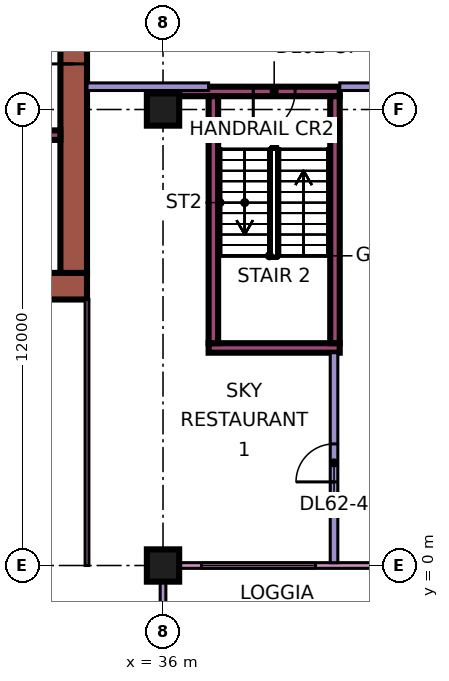
"""IFC4 building model, lengths in metres.
Left out: names, types, materials, properties, quantities, classifications, styles, units other than length and angle.
Written with IfcOpenShell. Run it as: python <this file> out.ifc"""

import sys

from ifc_helpers import new_model, si_unit, direction, frame, frame_2d, origin, origin_2d, place, context, subcontext, project, spatial, rectangle, extrude, element, fill, save


model = new_model("IFC4")
c1 = context("Model", 3, precision=1e-05, world=origin(), true_north=direction((0.0, 1.0)))
c2 = subcontext(c1, "Body", "Model", "MODEL_VIEW")
j1 = project(units=[si_unit("LENGTHUNIT", "METRE"), si_unit("PLANEANGLEUNIT", "RADIAN")], contexts=[c1])
p1 = place(None, origin())
s1 = spatial("IfcSite", under=j1, at=p1, CompositionType="ELEMENT")
p2 = place(p1, origin())
s2 = spatial("IfcBuilding", under=s1, at=p2, CompositionType="ELEMENT")
p3 = place(p2, frame((0.0, 0.0, 262.15)))
s3 = spatial("IfcBuildingStorey", under=s2, at=p3, CompositionType="ELEMENT", Elevation=262.15)
for number, where, z_axis, x_axis in (
    (1, (36.0, 0.0, 0.0), (0.0, 0.0, 1.0), (1.0, 0.0, 0.0)),
    (2, (36.0, 12.0, 0.0), (0.0, 0.0, 1.0), (1.0, 0.0, 0.0)),
):
    element("IfcColumn", number, at=place(p3, frame(where, z_axis=z_axis, x_axis=x_axis)), inside=s3, PredefinedType="COLUMN", context=c2, shape_type="SweptSolid", body=[
        extrude(rectangle(XDim=0.85, YDim=0.85, at=origin_2d()), origin(), (0.0, 0.0, 1.0), 11.25),
    ])
p4 = place(p3, frame((9.0, 7.35, 0.0), z_axis=(0.0, 0.0, 1.0), x_axis=(1.0, 0.0, 0.0)))
e3 = element("IfcWall", 3, at=p4, inside=s3, PredefinedType="SHEAR", context=c2, shape_type="SweptSolid", body=[
    extrude(rectangle(XDim=25.0, YDim=0.7, at=frame_2d((12.5, 0.0))), origin(), (0.0, 0.0, 1.0), 11.25),
])
p5 = place(p3, frame((33.65, 7.7, 0.0), z_axis=(0.0, 0.0, 1.0), x_axis=(0.0, 1.0, 0.0)))
e4 = element("IfcWall", 4, at=p5, inside=s3, PredefinedType="SHEAR", context=c2, shape_type="SweptSolid", body=[
    extrude(rectangle(XDim=11.6, YDim=0.7, at=frame_2d((5.8, 0.0))), origin(), (0.0, 0.0, 1.0), 11.25),
])
p6 = place(p5, frame((5.5, 0.0, 0.0)))
e5 = element("IfcOpeningElement", 5, at=p6, cuts=e4, PredefinedType="OPENING", context=c2, shape_type="SweptSolid", body=[
    extrude(rectangle(XDim=1.8, YDim=2.4, at=frame_2d((0.9, 1.2))), frame((0.0, 0.36, 0.0), z_axis=(0.0, -1.0, 0.0), x_axis=(1.0, 0.0, 0.0)), (0.0, 0.0, 1.0), 0.72),
])
p7 = place(p3, frame((13.45, 11.325, 0.0), z_axis=(0.0, 0.0, 1.0), x_axis=(1.0, 0.0, 0.0)))
e6 = element("IfcWall", 6, at=p7, inside=s3, PredefinedType="SHEAR", context=c2, shape_type="SweptSolid", body=[
    extrude(rectangle(XDim=19.85, YDim=0.25, at=frame_2d((9.925, 0.0))), origin(), (0.0, 0.0, 1.0), 11.25),
])
p8 = place(p7, frame((11.65, 0.0, 0.0)))
e7 = element("IfcOpeningElement", 7, at=p8, cuts=e6, PredefinedType="OPENING", context=c2, shape_type="SweptSolid", body=[
    extrude(rectangle(XDim=1.2, YDim=2.2, at=frame_2d((0.6, 1.1))), frame((0.0, 0.135, 0.0), z_axis=(0.0, -1.0, 0.0), x_axis=(1.0, 0.0, 0.0)), (0.0, 0.0, 1.0), 0.27),
])
p9 = place(p7, frame((14.4, 0.0, 0.0)))
e8 = element("IfcOpeningElement", 8, at=p9, cuts=e6, PredefinedType="OPENING", context=c2, shape_type="SweptSolid", body=[
    extrude(rectangle(XDim=1.2, YDim=2.2, at=frame_2d((0.6, 1.1))), frame((0.0, 0.135, 0.0), z_axis=(0.0, -1.0, 0.0), x_axis=(1.0, 0.0, 0.0)), (0.0, 0.0, 1.0), 0.27),
])
p10 = place(p7, frame((17.15, 0.0, 0.0)))
e9 = element("IfcOpeningElement", 9, at=p10, cuts=e6, PredefinedType="OPENING", context=c2, shape_type="SweptSolid", body=[
    extrude(rectangle(XDim=1.2, YDim=2.2, at=frame_2d((0.6, 1.1))), frame((0.0, 0.135, 0.0), z_axis=(0.0, -1.0, 0.0), x_axis=(1.0, 0.0, 0.0)), (0.0, 0.0, 1.0), 0.27),
])
p11 = place(p7, frame((1.55, 0.0, 0.0)))
e10 = element("IfcOpeningElement", 10, at=p11, cuts=e6, PredefinedType="OPENING", context=c2, shape_type="SweptSolid", body=[
    extrude(rectangle(XDim=0.9, YDim=2.1, at=frame_2d((0.45, 1.05))), frame((0.0, 0.135, 0.0), z_axis=(0.0, -1.0, 0.0), x_axis=(1.0, 0.0, 0.0)), (0.0, 0.0, 1.0), 0.27),
])
p12 = place(p7, frame((6.925, 0.0, 0.0)))
e11 = element("IfcOpeningElement", 11, at=p12, cuts=e6, PredefinedType="OPENING", context=c2, shape_type="SweptSolid", body=[
    extrude(rectangle(XDim=0.9, YDim=2.1, at=frame_2d((0.45, 1.05))), frame((0.0, 0.135, 0.0), z_axis=(0.0, -1.0, 0.0), x_axis=(1.0, 0.0, 0.0)), (0.0, 0.0, 1.0), 0.27),
])
p13 = place(p3, frame((37.2, 5.725, 0.0), z_axis=(0.0, 0.0, 1.0), x_axis=(1.0, 0.0, 0.0)))
e12 = element("IfcWall", 12, at=p13, inside=s3, PredefinedType="SHEAR", context=c2, shape_type="SweptSolid", body=[
    extrude(rectangle(XDim=3.45, YDim=0.25, at=frame_2d((1.725, 0.0))), origin(), (0.0, 0.0, 1.0), 11.25),
])
p14 = place(p3, frame((36.425, 12.475, 0.0), z_axis=(0.0, 0.0, 1.0), x_axis=(1.0, 0.0, 0.0)))
e13 = element("IfcWall", 13, at=p14, inside=s3, PredefinedType="SHEAR", context=c2, shape_type="SweptSolid", body=[
    extrude(rectangle(XDim=4.225, YDim=0.25, at=frame_2d((2.112, 0.0))), origin(), (0.0, 0.0, 1.0), 11.25),
])
p15 = place(p14, frame((1.95, 0.0, 0.0)))
e14 = element("IfcOpeningElement", 14, at=p15, cuts=e13, PredefinedType="OPENING", context=c2, shape_type="SweptSolid", body=[
    extrude(rectangle(XDim=1.1, YDim=2.2, at=frame_2d((0.55, 1.1))), frame((0.0, 0.135, 0.0), z_axis=(0.0, -1.0, 0.0), x_axis=(1.0, 0.0, 0.0)), (0.0, 0.0, 1.0), 0.27),
])
for number, where, z_axis, x_axis in (
    (15, (37.325, 5.85, 0.0), (0.0, 0.0, 1.0), (0.0, 1.0, 0.0)),
    (16, (40.525, 5.85, 0.0), (0.0, 0.0, 1.0), (0.0, 1.0, 0.0)),
):
    element("IfcWall", number, at=place(p3, frame(where, z_axis=z_axis, x_axis=x_axis)), inside=s3, PredefinedType="SHEAR", context=c2, shape_type="SweptSolid", body=[
        extrude(rectangle(XDim=6.5, YDim=0.25, at=frame_2d((3.25, 0.0))), origin(), (0.0, 0.0, 1.0), 11.25),
    ])
p16 = place(p3, frame((36.075, 0.0, 0.0), z_axis=(0.0, 0.0, 1.0), x_axis=(1.0, 0.0, 0.0)))
e17 = element("IfcWall", 17, at=p16, inside=s3, PredefinedType="SOLIDWALL", context=c2, shape_type="SweptSolid", body=[
    extrude(rectangle(XDim=11.85, YDim=0.15, at=frame_2d((5.925, 0.0))), origin(), (0.0, 0.0, 1.0), 10.85),
])
p17 = place(p16, frame((0.938, 0.0, 0.45)))
e18 = element("IfcOpeningElement", 18, at=p17, cuts=e17, PredefinedType="OPENING", context=c2, shape_type="SweptSolid", body=[
    extrude(rectangle(XDim=3.0, YDim=9.8, at=frame_2d((1.5, 4.9))), frame((0.0, 0.085, 0.0), z_axis=(0.0, -1.0, 0.0), x_axis=(1.0, 0.0, 0.0)), (0.0, 0.0, 1.0), 0.17),
])
p18 = place(p3, frame((36.0, -1.5, 0.0), z_axis=(0.0, 0.0, 1.0), x_axis=(0.0, 1.0, 0.0)))
e19 = element("IfcWall", 19, at=p18, inside=s3, PredefinedType="SOLIDWALL", context=c2, shape_type="SweptSolid", body=[
    extrude(rectangle(XDim=1.5, YDim=0.15, at=frame_2d((0.75, 0.0))), origin(), (0.0, 0.0, 1.0), 10.85),
])
p19 = place(p3, frame((34.0, 0.0, 0.0), z_axis=(0.0, 0.0, 1.0), x_axis=(0.0, 1.0, 0.0)))
e20 = element("IfcWall", 20, at=p19, inside=s3, PredefinedType="PARTITIONING", context=c2, shape_type="SweptSolid", body=[
    extrude(rectangle(XDim=7.0, YDim=0.1, at=frame_2d((3.5, 0.0))), origin(), (0.0, 0.0, 1.0), 10.85),
])
p20 = place(p3, frame((34.0, 12.6, 0.0), z_axis=(0.0, 0.0, 1.0), x_axis=(1.0, 0.0, 0.0)))
e21 = element("IfcWall", 21, at=p20, inside=s3, PredefinedType="PARTITIONING", context=c2, shape_type="SweptSolid", body=[
    extrude(rectangle(XDim=3.2, YDim=0.2, at=frame_2d((1.6, 0.0))), origin(), (0.0, 0.0, 1.0), 10.85),
])
p21 = place(p3, frame((40.5, 0.074, 0.0), z_axis=(0.0, 0.0, 1.0), x_axis=(0.0, 1.0, 0.0)))
e22 = element("IfcWall", 22, at=p21, inside=s3, PredefinedType="PARTITIONING", context=c2, shape_type="SweptSolid", body=[
    extrude(rectangle(XDim=5.526, YDim=0.2, at=frame_2d((2.763, 0.0))), origin(), (0.0, 0.0, 1.0), 10.85),
])
p22 = place(p21, frame((2.126, 0.0, 0.0)))
e23 = element("IfcOpeningElement", 23, at=p22, cuts=e22, PredefinedType="OPENING", context=c2, shape_type="SweptSolid", body=[
    extrude(rectangle(XDim=1.0, YDim=2.1, at=frame_2d((0.5, 1.05))), frame((0.0, 0.11, 0.0), z_axis=(0.0, -1.0, 0.0), x_axis=(1.0, 0.0, 0.0)), (0.0, 0.0, 1.0), 0.22),
])
p23 = place(p3, frame((40.65, 12.6, 0.0), z_axis=(0.0, 0.0, 1.0), x_axis=(1.0, 0.0, 0.0)))
e24 = element("IfcWall", 24, at=p23, inside=s3, PredefinedType="PARTITIONING", context=c2, shape_type="SweptSolid", body=[
    extrude(rectangle(XDim=22.276, YDim=0.2, at=frame_2d((11.138, 0.0))), origin(), (0.0, 0.0, 1.0), 10.85),
])
p24 = place(p23, frame((11.75, 0.0, 0.0)))
e25 = element("IfcOpeningElement", 25, at=p24, cuts=e24, PredefinedType="OPENING", context=c2, shape_type="SweptSolid", body=[
    extrude(rectangle(XDim=1.0, YDim=2.1, at=frame_2d((0.5, 1.05))), frame((0.0, 0.11, 0.0), z_axis=(0.0, -1.0, 0.0), x_axis=(1.0, 0.0, 0.0)), (0.0, 0.0, 1.0), 0.22),
])
p25 = place(p23, frame((19.5, 0.0, 0.0)))
e26 = element("IfcOpeningElement", 26, at=p25, cuts=e24, PredefinedType="OPENING", context=c2, shape_type="SweptSolid", body=[
    extrude(rectangle(XDim=1.0, YDim=2.1, at=frame_2d((0.5, 1.05))), frame((0.0, 0.11, 0.0), z_axis=(0.0, -1.0, 0.0), x_axis=(1.0, 0.0, 0.0)), (0.0, 0.0, 1.0), 0.22),
])
p26 = place(p17, origin())
e27 = element("IfcWindow", 27, at=p26, inside=s3, PartitioningType="SINGLE_PANEL", PredefinedType="WINDOW", context=c2, shape_type="SweptSolid", body=[
    extrude(rectangle(XDim=3.0, YDim=9.8, at=frame_2d((1.5, 4.9))), frame((0.0, 0.03, 0.0), z_axis=(0.0, -1.0, 0.0), x_axis=(1.0, 0.0, 0.0)), (0.0, 0.0, 1.0), 0.06),
])
fill(e18, e27)
p27 = place(p6, origin())
e28 = element("IfcDoor", 28, at=p27, inside=s3, OperationType="DOUBLE_DOOR_SINGLE_SWING", PredefinedType="DOOR", context=c2, shape_type="SweptSolid", body=[
    extrude(rectangle(XDim=1.8, YDim=2.4, at=frame_2d((0.9, 1.2))), frame((0.0, 0.025, 0.0), z_axis=(0.0, -1.0, 0.0), x_axis=(1.0, 0.0, 0.0)), (0.0, 0.0, 1.0), 0.05),
])
fill(e5, e28)
p28 = place(p15, frame((1.1, 0.0, 0.0), z_axis=(0.0, 0.0, 1.0), x_axis=(-1.0, 0.0, 0.0)))
e29 = element("IfcDoor", 29, at=p28, inside=s3, OperationType="SINGLE_SWING_LEFT", PredefinedType="DOOR", context=c2, shape_type="SweptSolid", body=[
    extrude(rectangle(XDim=1.1, YDim=2.2, at=frame_2d((0.55, 1.1))), frame((0.0, 0.025, 0.0), z_axis=(0.0, -1.0, 0.0), x_axis=(1.0, 0.0, 0.0)), (0.0, 0.0, 1.0), 0.05),
])
fill(e14, e29)
p29 = place(p22, origin())
e30 = element("IfcDoor", 30, at=p29, inside=s3, OperationType="SINGLE_SWING_LEFT", PredefinedType="DOOR", context=c2, shape_type="SweptSolid", body=[
    extrude(rectangle(XDim=1.0, YDim=2.1, at=frame_2d((0.5, 1.05))), frame((0.0, 0.025, 0.0), z_axis=(0.0, -1.0, 0.0), x_axis=(1.0, 0.0, 0.0)), (0.0, 0.0, 1.0), 0.05),
])
fill(e23, e30)
save(model, sys.argv[1])
